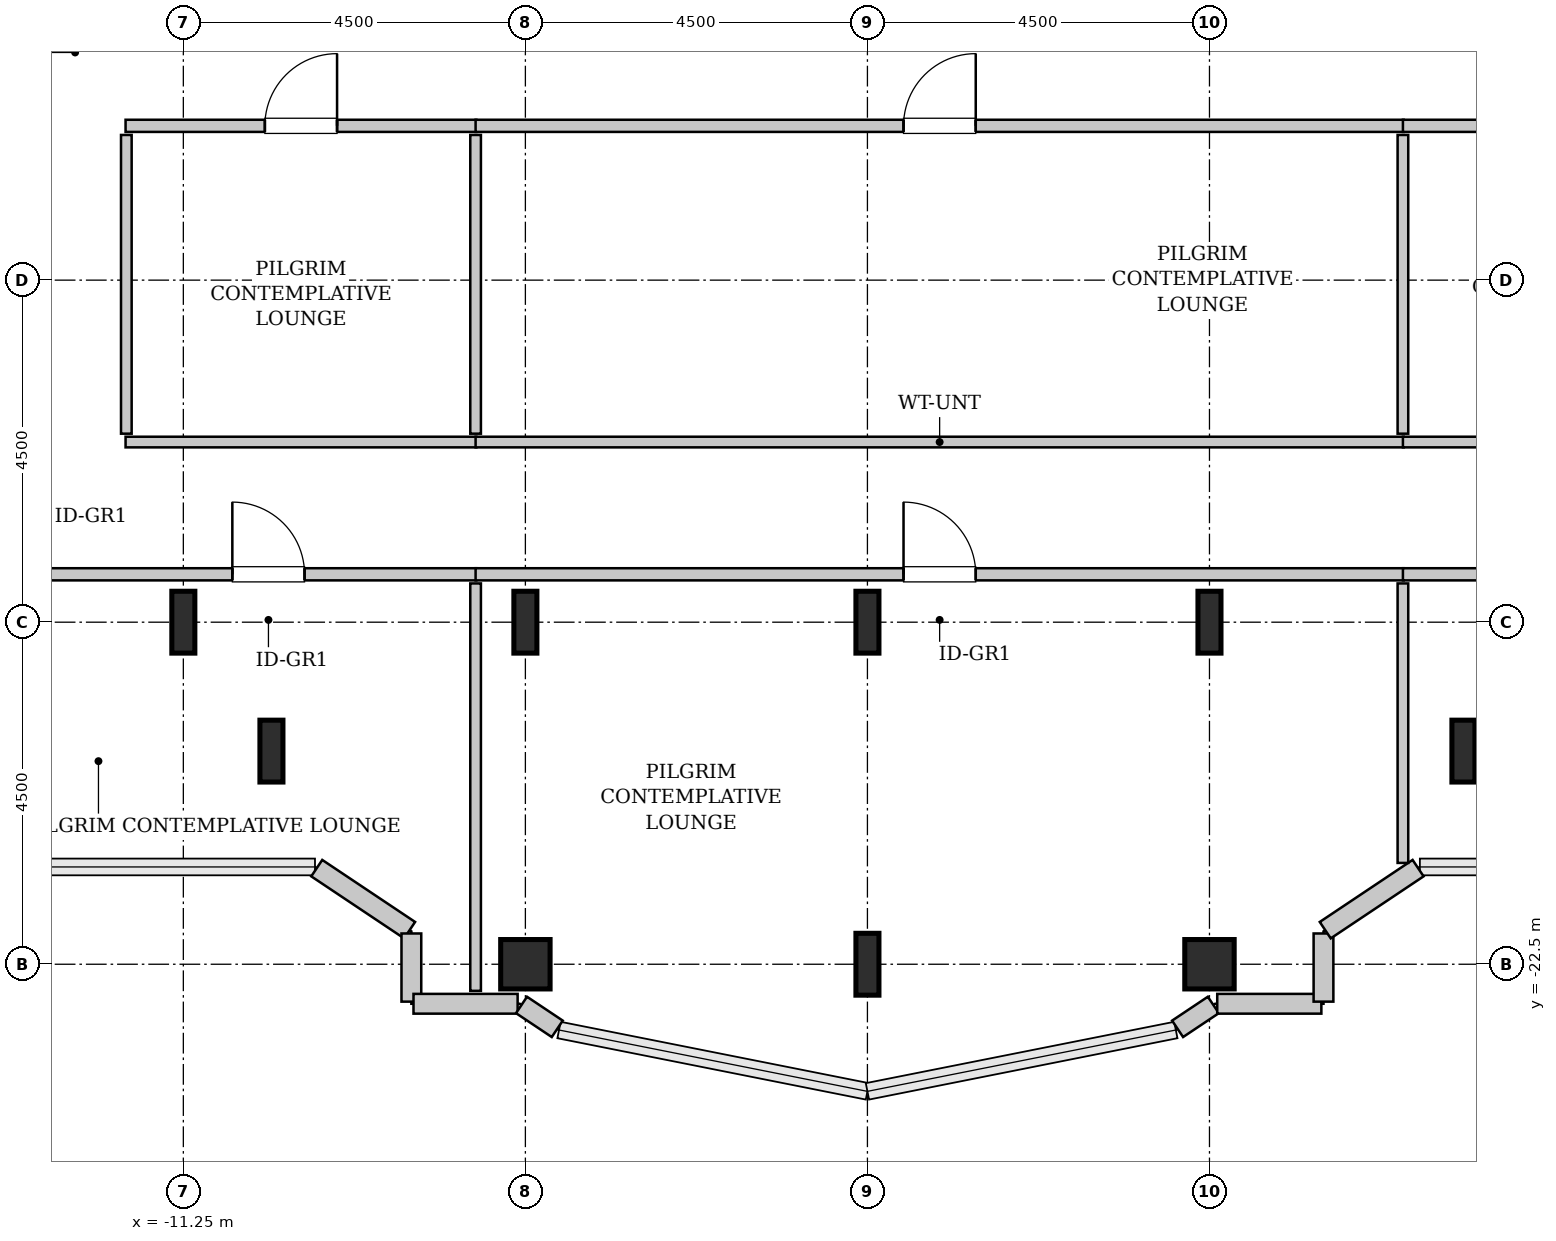
"""IFC4 building model, lengths in metres.
Left out: names, types, materials, properties, quantities, classifications, styles, units other than length and angle.
Written with IfcOpenShell. Run it as: python <this file> out.ifc"""

import sys

from ifc_helpers import new_model, si_unit, direction, frame, frame_2d, origin, origin_2d, place, context, subcontext, project, spatial, rectangle, hollow_rectangle, i_section, extrude, source, transform, mapped, element, fill, save


model = new_model("IFC4")
c1 = context("Model", 3, precision=1e-05, world=origin(), true_north=direction((0.0, 1.0)))
c2 = subcontext(c1, "Body", "Model", "MODEL_VIEW")
j1 = project(units=[si_unit("LENGTHUNIT", "METRE"), si_unit("PLANEANGLEUNIT", "RADIAN")], contexts=[c1])
p1 = place(None, origin())
s1 = spatial("IfcSite", under=j1, at=p1, CompositionType="ELEMENT")
p2 = place(p1, origin())
s2 = spatial("IfcBuilding", under=s1, at=p2, CompositionType="ELEMENT")
p3 = place(p2, frame((0.0, 0.0, 244.6)))
s3 = spatial("IfcBuildingStorey", under=s2, at=p3, CompositionType="ELEMENT", Elevation=244.6)
m1 = source(origin(), c2, "Body", "SweptSolid", [
    extrude(i_section(OverallWidth=0.303, OverallDepth=0.814, WebThickness=0.021, FlangeThickness=0.04, FilletRadius=0.03, at=origin_2d()), origin(), (0.0, 0.0, 1.0), 3.8),
])
for number, where, z_axis, x_axis in (
    (1, (-11.25, -18.0, 0.0), (0.0, 0.0, 1.0), (1.0, 0.0, 0.0)),
    (2, (-10.091, -19.696, 0.0), (0.0, 0.0, 1.0), (1.0, 0.0, 0.0)),
):
    element("IfcColumn", number, at=place(p3, frame(where, z_axis=z_axis, x_axis=x_axis)), inside=s3, PredefinedType="COLUMN", context=c2, shape_type="MappedRepresentation", body=[
        mapped(m1, transform((0.0, 0.0, 0.0), x_axis=(1.0, 0.0, 0.0), y_axis=(0.0, 1.0, 0.0), z_axis=(0.0, 0.0, 1.0), scale=1.0)),
    ])
m2 = source(origin(), c2, "Body", "SweptSolid", [
    extrude(hollow_rectangle(XDim=0.65, YDim=0.65, WallThickness=0.032, InnerFilletRadius=0.032, OuterFilletRadius=0.064, at=origin_2d()), origin(), (0.0, 0.0, 1.0), 3.8),
])
p4 = place(p3, frame((-6.75, -22.5, 0.0), z_axis=(0.0, 0.0, 1.0), x_axis=(1.0, 0.0, 0.0)))
e3 = element("IfcColumn", 3, at=p4, inside=s3, PredefinedType="COLUMN", context=c2, shape_type="MappedRepresentation", body=[
    mapped(m2, transform((0.0, 0.0, 0.0), x_axis=(1.0, 0.0, 0.0), y_axis=(0.0, 1.0, 0.0), z_axis=(0.0, 0.0, 1.0), scale=1.0)),
])
for number, where, z_axis, x_axis in (
    (4, (-6.75, -18.0, 0.0), (0.0, 0.0, 1.0), (1.0, 0.0, 0.0)),
    (5, (-2.25, -22.5, 0.0), (0.0, 0.0, 1.0), (1.0, 0.0, 0.0)),
    (6, (-2.25, -18.0, 0.0), (0.0, 0.0, 1.0), (1.0, 0.0, 0.0)),
):
    element("IfcColumn", number, at=place(p3, frame(where, z_axis=z_axis, x_axis=x_axis)), inside=s3, PredefinedType="COLUMN", context=c2, shape_type="MappedRepresentation", body=[
        mapped(m1, transform((0.0, 0.0, 0.0), x_axis=(1.0, 0.0, 0.0), y_axis=(0.0, 1.0, 0.0), z_axis=(0.0, 0.0, 1.0), scale=1.0)),
    ])
p5 = place(p3, frame((2.25, -22.5, 0.0), z_axis=(0.0, 0.0, 1.0), x_axis=(1.0, 0.0, 0.0)))
e7 = element("IfcColumn", 7, at=p5, inside=s3, PredefinedType="COLUMN", context=c2, shape_type="MappedRepresentation", body=[
    mapped(m2, transform((0.0, 0.0, 0.0), x_axis=(1.0, 0.0, 0.0), y_axis=(0.0, 1.0, 0.0), z_axis=(0.0, 0.0, 1.0), scale=1.0)),
])
for number, where, z_axis, x_axis in (
    (8, (2.25, -18.0, 0.0), (0.0, 0.0, 1.0), (1.0, 0.0, 0.0)),
    (9, (5.591, -19.696, 0.0), (0.0, 0.0, 1.0), (1.0, 0.0, 0.0)),
):
    element("IfcColumn", number, at=place(p3, frame(where, z_axis=z_axis, x_axis=x_axis)), inside=s3, PredefinedType="COLUMN", context=c2, shape_type="MappedRepresentation", body=[
        mapped(m1, transform((0.0, 0.0, 0.0), x_axis=(1.0, 0.0, 0.0), y_axis=(0.0, 1.0, 0.0), z_axis=(0.0, 0.0, 1.0), scale=1.0)),
    ])
m3 = source(origin(), c2, "Body", "SweptSolid", [
    extrude(rectangle(XDim=1.469, YDim=0.26, at=frame_2d((0.734, 0.0))), origin(), (0.0, 0.0, 1.0), 3.55),
])
p6 = place(p3, frame((-9.495, -21.236, 0.0), z_axis=(0.0, 0.0, 1.0), x_axis=(0.831461760506, -0.555581983884, 0.0)))
e10 = element("IfcWall", 10, at=p6, inside=s3, PredefinedType="SOLIDWALL", context=c2, shape_type="MappedRepresentation", body=[
    mapped(m3, transform((0.0, 0.0, 0.0), x_axis=(1.0, 0.0, 0.0), y_axis=(0.0, 1.0, 0.0), z_axis=(0.0, 0.0, 1.0), scale=1.0)),
])
m4 = source(origin(), c2, "Body", "SweptSolid", [
    extrude(rectangle(XDim=0.897, YDim=0.26, at=frame_2d((0.448, 0.0))), origin(), (0.0, 0.0, 1.0), 3.55),
])
p7 = place(p3, frame((-8.25, -22.095, 0.0), z_axis=(0.0, 0.0, 1.0), x_axis=(0.0, -1.0, 0.0)))
e11 = element("IfcWall", 11, at=p7, inside=s3, PredefinedType="SOLIDWALL", context=c2, shape_type="MappedRepresentation", body=[
    mapped(m4, transform((0.0, 0.0, 0.0), x_axis=(1.0, 0.0, 0.0), y_axis=(0.0, 1.0, 0.0), z_axis=(0.0, 0.0, 1.0), scale=1.0)),
])
m5 = source(origin(), c2, "Body", "SweptSolid", [
    extrude(rectangle(XDim=1.37, YDim=0.26, at=frame_2d((0.685, 0.0))), origin(), (0.0, 0.0, 1.0), 3.55),
])
p8 = place(p3, frame((-8.222, -23.02, 0.0), z_axis=(0.0, 0.0, 1.0), x_axis=(1.0, 0.0, 0.0)))
e12 = element("IfcWall", 12, at=p8, inside=s3, PredefinedType="SOLIDWALL", context=c2, shape_type="MappedRepresentation", body=[
    mapped(m5, transform((0.0, 0.0, 0.0), x_axis=(1.0, 0.0, 0.0), y_axis=(0.0, 1.0, 0.0), z_axis=(0.0, 0.0, 1.0), scale=1.0)),
])
m6 = source(origin(), c2, "Body", "SweptSolid", [
    extrude(rectangle(XDim=0.565, YDim=0.26, at=frame_2d((0.283, 0.0))), origin(), (0.0, 0.0, 1.0), 3.55),
])
for number, where, z_axis, x_axis in (
    (13, (-6.801, -23.036, 0.0), (0.0, 0.0, 1.0), (0.832, -0.555, 0.0)),
    (14, (1.831, -23.35, 0.0), (0.0, 0.0, 1.0), (0.832, 0.555, 0.0)),
):
    element("IfcWall", number, at=place(p3, frame(where, z_axis=z_axis, x_axis=x_axis)), inside=s3, PredefinedType="SOLIDWALL", context=c2, shape_type="MappedRepresentation", body=[
        mapped(m6, transform((0.0, 0.0, 0.0), x_axis=(1.0, 0.0, 0.0), y_axis=(0.0, 1.0, 0.0), z_axis=(0.0, 0.0, 1.0), scale=1.0)),
    ])
p9 = place(p3, frame((2.352, -23.02, 0.0), z_axis=(0.0, 0.0, 1.0), x_axis=(1.0, 0.0, 0.0)))
e15 = element("IfcWall", 15, at=p9, inside=s3, PredefinedType="SOLIDWALL", context=c2, shape_type="MappedRepresentation", body=[
    mapped(m5, transform((0.0, 0.0, 0.0), x_axis=(1.0, 0.0, 0.0), y_axis=(0.0, 1.0, 0.0), z_axis=(0.0, 0.0, 1.0), scale=1.0)),
])
p10 = place(p3, frame((3.75, -22.992, 0.0), z_axis=(0.0, 0.0, 1.0), x_axis=(0.0, 1.0, 0.0)))
e16 = element("IfcWall", 16, at=p10, inside=s3, PredefinedType="SOLIDWALL", context=c2, shape_type="MappedRepresentation", body=[
    mapped(m4, transform((0.0, 0.0, 0.0), x_axis=(1.0, 0.0, 0.0), y_axis=(0.0, 1.0, 0.0), z_axis=(0.0, 0.0, 1.0), scale=1.0)),
])
p11 = place(p3, frame((3.773, -22.052, 0.0), z_axis=(0.0, 0.0, 1.0), x_axis=(0.831461760506, 0.555581983884, 0.0)))
e17 = element("IfcWall", 17, at=p11, inside=s3, PredefinedType="SOLIDWALL", context=c2, shape_type="MappedRepresentation", body=[
    mapped(m3, transform((0.0, 0.0, 0.0), x_axis=(1.0, 0.0, 0.0), y_axis=(0.0, 1.0, 0.0), z_axis=(0.0, 0.0, 1.0), scale=1.0)),
])
m7 = source(origin(), c2, "Body", "SweptSolid", [
    extrude(rectangle(XDim=6.225, YDim=0.16, at=frame_2d((3.113, 0.0))), origin(), (0.0, 0.0, 1.0), 3.535),
])
p12 = place(p3, frame((-13.62, -17.37, 0.0), z_axis=(0.0, 0.0, 1.0), x_axis=(1.0, 0.0, 0.0)))
e18 = element("IfcWall", 18, at=p12, inside=s3, PredefinedType="PARTITIONING", context=c2, shape_type="MappedRepresentation", body=[
    mapped(m7, transform((0.0, 0.0, 0.0), x_axis=(1.0, 0.0, 0.0), y_axis=(0.0, 1.0, 0.0), z_axis=(0.0, 0.0, 1.0), scale=1.0)),
])
p13 = place(p12, frame((3.015, 0.0, 0.0)))
e19 = element("IfcOpeningElement", 19, at=p13, cuts=e18, PredefinedType="OPENING", context=c2, shape_type="SweptSolid", body=[
    extrude(rectangle(XDim=0.95, YDim=2.1, at=frame_2d((0.475, 1.05))), frame((0.0, 0.09, 0.0), z_axis=(0.0, -1.0, 0.0), x_axis=(1.0, 0.0, 0.0)), (0.0, 0.0, 1.0), 0.18),
])
m8 = source(origin(), c2, "Body", "SweptSolid", [
    extrude(rectangle(XDim=5.36, YDim=0.14, at=frame_2d((2.68, 0.0))), origin(), (0.0, 0.0, 1.0), 3.535),
])
p14 = place(p3, frame((-7.405, -22.85, 0.0), z_axis=(0.0, 0.0, 1.0), x_axis=(0.0, 1.0, 0.0)))
e20 = element("IfcWall", 20, at=p14, inside=s3, PredefinedType="PARTITIONING", context=c2, shape_type="MappedRepresentation", body=[
    mapped(m8, transform((0.0, 0.0, 0.0), x_axis=(1.0, 0.0, 0.0), y_axis=(0.0, 1.0, 0.0), z_axis=(0.0, 0.0, 1.0), scale=1.0)),
])
m9 = source(origin(), c2, "Body", "SweptSolid", [
    extrude(rectangle(XDim=4.615, YDim=0.16, at=frame_2d((2.308, 0.0))), origin(), (0.0, 0.0, 1.0), 3.535),
])
p15 = place(p3, frame((-12.01, -11.47, 0.0), z_axis=(0.0, 0.0, 1.0), x_axis=(1.0, 0.0, 0.0)))
e21 = element("IfcWall", 21, at=p15, inside=s3, PredefinedType="PARTITIONING", context=c2, shape_type="MappedRepresentation", body=[
    mapped(m9, transform((0.0, 0.0, 0.0), x_axis=(1.0, 0.0, 0.0), y_axis=(0.0, 1.0, 0.0), z_axis=(0.0, 0.0, 1.0), scale=1.0)),
])
p16 = place(p15, frame((1.833, 0.0, 0.0)))
e22 = element("IfcOpeningElement", 22, at=p16, cuts=e21, PredefinedType="OPENING", context=c2, shape_type="SweptSolid", body=[
    extrude(rectangle(XDim=0.95, YDim=2.1, at=frame_2d((0.475, 1.05))), frame((0.0, 0.09, 0.0), z_axis=(0.0, -1.0, 0.0), x_axis=(1.0, 0.0, 0.0)), (0.0, 0.0, 1.0), 0.18),
])
m10 = source(origin(), c2, "Body", "SweptSolid", [
    extrude(rectangle(XDim=4.615, YDim=0.14, at=frame_2d((2.308, 0.0))), origin(), (0.0, 0.0, 1.0), 3.535),
])
p17 = place(p3, frame((-12.01, -15.63, 0.0), z_axis=(0.0, 0.0, 1.0), x_axis=(1.0, 0.0, 0.0)))
e23 = element("IfcWall", 23, at=p17, inside=s3, PredefinedType="PARTITIONING", context=c2, shape_type="MappedRepresentation", body=[
    mapped(m10, transform((0.0, 0.0, 0.0), x_axis=(1.0, 0.0, 0.0), y_axis=(0.0, 1.0, 0.0), z_axis=(0.0, 0.0, 1.0), scale=1.0)),
])
m11 = source(origin(), c2, "Body", "SweptSolid", [
    extrude(rectangle(XDim=3.93, YDim=0.14, at=frame_2d((1.965, 0.0))), origin(), (0.0, 0.0, 1.0), 3.535),
])
for number, where, z_axis, x_axis in (
    (24, (-12.0, -15.52, 0.0), (0.0, 0.0, 1.0), (0.0, 1.0, 0.0)),
    (25, (-7.405, -15.52, 0.0), (0.0, 0.0, 1.0), (0.0, 1.0, 0.0)),
):
    element("IfcWall", number, at=place(p3, frame(where, z_axis=z_axis, x_axis=x_axis)), inside=s3, PredefinedType="PARTITIONING", context=c2, shape_type="MappedRepresentation", body=[
        mapped(m11, transform((0.0, 0.0, 0.0), x_axis=(1.0, 0.0, 0.0), y_axis=(0.0, 1.0, 0.0), z_axis=(0.0, 0.0, 1.0), scale=1.0)),
    ])
m12 = source(origin(), c2, "Body", "SweptSolid", [
    extrude(rectangle(XDim=12.21, YDim=0.16, at=frame_2d((6.105, 0.0))), origin(), (0.0, 0.0, 1.0), 3.535),
])
p18 = place(p3, frame((-7.405, -17.37, 0.0), z_axis=(0.0, 0.0, 1.0), x_axis=(1.0, 0.0, 0.0)))
e26 = element("IfcWall", 26, at=p18, inside=s3, PredefinedType="PARTITIONING", context=c2, shape_type="MappedRepresentation", body=[
    mapped(m12, transform((0.0, 0.0, 0.0), x_axis=(1.0, 0.0, 0.0), y_axis=(0.0, 1.0, 0.0), z_axis=(0.0, 0.0, 1.0), scale=1.0)),
])
p19 = place(p18, frame((5.63, 0.0, 0.0)))
e27 = element("IfcOpeningElement", 27, at=p19, cuts=e26, PredefinedType="OPENING", context=c2, shape_type="SweptSolid", body=[
    extrude(rectangle(XDim=0.95, YDim=2.1, at=frame_2d((0.475, 1.05))), frame((0.0, 0.09, 0.0), z_axis=(0.0, -1.0, 0.0), x_axis=(1.0, 0.0, 0.0)), (0.0, 0.0, 1.0), 0.18),
])
m13 = source(origin(), c2, "Body", "SweptSolid", [
    extrude(rectangle(XDim=3.677, YDim=0.14, at=frame_2d((1.838, 0.0))), origin(), (0.0, 0.0, 1.0), 3.535),
])
p20 = place(p3, frame((4.795, -21.167, 0.0), z_axis=(0.0, 0.0, 1.0), x_axis=(0.0, 1.0, 0.0)))
e28 = element("IfcWall", 28, at=p20, inside=s3, PredefinedType="PARTITIONING", context=c2, shape_type="MappedRepresentation", body=[
    mapped(m13, transform((0.0, 0.0, 0.0), x_axis=(1.0, 0.0, 0.0), y_axis=(0.0, 1.0, 0.0), z_axis=(0.0, 0.0, 1.0), scale=1.0)),
])
p21 = place(p3, frame((-7.405, -11.47, 0.0), z_axis=(0.0, 0.0, 1.0), x_axis=(1.0, 0.0, 0.0)))
e29 = element("IfcWall", 29, at=p21, inside=s3, PredefinedType="PARTITIONING", context=c2, shape_type="MappedRepresentation", body=[
    mapped(m12, transform((0.0, 0.0, 0.0), x_axis=(1.0, 0.0, 0.0), y_axis=(0.0, 1.0, 0.0), z_axis=(0.0, 0.0, 1.0), scale=1.0)),
])
p22 = place(p21, frame((5.63, 0.0, 0.0)))
e30 = element("IfcOpeningElement", 30, at=p22, cuts=e29, PredefinedType="OPENING", context=c2, shape_type="SweptSolid", body=[
    extrude(rectangle(XDim=0.95, YDim=2.1, at=frame_2d((0.475, 1.05))), frame((0.0, 0.09, 0.0), z_axis=(0.0, -1.0, 0.0), x_axis=(1.0, 0.0, 0.0)), (0.0, 0.0, 1.0), 0.18),
])
m14 = source(origin(), c2, "Body", "SweptSolid", [
    extrude(rectangle(XDim=12.21, YDim=0.14, at=frame_2d((6.105, 0.0))), origin(), (0.0, 0.0, 1.0), 3.535),
])
p23 = place(p3, frame((-7.405, -15.63, 0.0), z_axis=(0.0, 0.0, 1.0), x_axis=(1.0, 0.0, 0.0)))
e31 = element("IfcWall", 31, at=p23, inside=s3, PredefinedType="PARTITIONING", context=c2, shape_type="MappedRepresentation", body=[
    mapped(m14, transform((0.0, 0.0, 0.0), x_axis=(1.0, 0.0, 0.0), y_axis=(0.0, 1.0, 0.0), z_axis=(0.0, 0.0, 1.0), scale=1.0)),
])
p24 = place(p3, frame((4.795, -15.52, 0.0), z_axis=(0.0, 0.0, 1.0), x_axis=(0.0, 1.0, 0.0)))
e32 = element("IfcWall", 32, at=p24, inside=s3, PredefinedType="PARTITIONING", context=c2, shape_type="MappedRepresentation", body=[
    mapped(m11, transform((0.0, 0.0, 0.0), x_axis=(1.0, 0.0, 0.0), y_axis=(0.0, 1.0, 0.0), z_axis=(0.0, 0.0, 1.0), scale=1.0)),
])
m15 = source(origin(), c2, "Body", "SweptSolid", [
    extrude(rectangle(XDim=8.825, YDim=0.16, at=frame_2d((4.413, 0.0))), origin(), (0.0, 0.0, 1.0), 3.535),
])
p25 = place(p3, frame((4.795, -17.37, 0.0), z_axis=(0.0, 0.0, 1.0), x_axis=(1.0, 0.0, 0.0)))
e33 = element("IfcWall", 33, at=p25, inside=s3, PredefinedType="PARTITIONING", context=c2, shape_type="MappedRepresentation", body=[
    mapped(m15, transform((0.0, 0.0, 0.0), x_axis=(1.0, 0.0, 0.0), y_axis=(0.0, 1.0, 0.0), z_axis=(0.0, 0.0, 1.0), scale=1.0)),
])
p26 = place(p25, frame((3.938, 0.0, 0.0)))
e34 = element("IfcOpeningElement", 34, at=p26, cuts=e33, PredefinedType="OPENING", context=c2, shape_type="SweptSolid", body=[
    extrude(rectangle(XDim=0.95, YDim=2.1, at=frame_2d((0.475, 1.05))), frame((0.0, 0.09, 0.0), z_axis=(0.0, -1.0, 0.0), x_axis=(1.0, 0.0, 0.0)), (0.0, 0.0, 1.0), 0.18),
])
m16 = source(origin(), c2, "Body", "SweptSolid", [
    extrude(rectangle(XDim=7.215, YDim=0.16, at=frame_2d((3.607, 0.0))), origin(), (0.0, 0.0, 1.0), 3.535),
])
p27 = place(p3, frame((4.795, -11.47, 0.0), z_axis=(0.0, 0.0, 1.0), x_axis=(1.0, 0.0, 0.0)))
e35 = element("IfcWall", 35, at=p27, inside=s3, PredefinedType="PARTITIONING", context=c2, shape_type="MappedRepresentation", body=[
    mapped(m16, transform((0.0, 0.0, 0.0), x_axis=(1.0, 0.0, 0.0), y_axis=(0.0, 1.0, 0.0), z_axis=(0.0, 0.0, 1.0), scale=1.0)),
])
p28 = place(p27, frame((3.133, 0.0, 0.0)))
e36 = element("IfcOpeningElement", 36, at=p28, cuts=e35, PredefinedType="OPENING", context=c2, shape_type="SweptSolid", body=[
    extrude(rectangle(XDim=0.95, YDim=2.1, at=frame_2d((0.475, 1.05))), frame((0.0, 0.09, 0.0), z_axis=(0.0, -1.0, 0.0), x_axis=(1.0, 0.0, 0.0)), (0.0, 0.0, 1.0), 0.18),
])
m17 = source(origin(), c2, "Body", "SweptSolid", [
    extrude(rectangle(XDim=7.215, YDim=0.14, at=frame_2d((3.607, 0.0))), origin(), (0.0, 0.0, 1.0), 3.535),
])
p29 = place(p3, frame((4.795, -15.63, 0.0), z_axis=(0.0, 0.0, 1.0), x_axis=(1.0, 0.0, 0.0)))
e37 = element("IfcWall", 37, at=p29, inside=s3, PredefinedType="PARTITIONING", context=c2, shape_type="MappedRepresentation", body=[
    mapped(m17, transform((0.0, 0.0, 0.0), x_axis=(1.0, 0.0, 0.0), y_axis=(0.0, 1.0, 0.0), z_axis=(0.0, 0.0, 1.0), scale=1.0)),
])
m18 = source(origin(), c2, "Body", "SweptSolid", [
    extrude(rectangle(XDim=0.95, YDim=2.1, at=frame_2d((0.475, 1.05))), frame((0.0, 0.025, 0.0), z_axis=(0.0, -1.0, 0.0), x_axis=(1.0, 0.0, 0.0)), (0.0, 0.0, 1.0), 0.05),
])
p30 = place(p13, origin())
e38 = element("IfcDoor", 38, at=p30, inside=s3, OperationType="SINGLE_SWING_LEFT", PredefinedType="DOOR", context=c2, shape_type="MappedRepresentation", body=[
    mapped(m18, transform((0.0, 0.0, 0.0), x_axis=(1.0, 0.0, 0.0), y_axis=(0.0, 1.0, 0.0), z_axis=(0.0, 0.0, 1.0), scale=1.0)),
])
fill(e19, e38)
p31 = place(p16, origin())
e39 = element("IfcDoor", 39, at=p31, inside=s3, OperationType="SINGLE_SWING_RIGHT", PredefinedType="DOOR", context=c2, shape_type="MappedRepresentation", body=[
    mapped(m18, transform((0.0, 0.0, 0.0), x_axis=(1.0, 0.0, 0.0), y_axis=(0.0, 1.0, 0.0), z_axis=(0.0, 0.0, 1.0), scale=1.0)),
])
fill(e22, e39)
p32 = place(p19, origin())
e40 = element("IfcDoor", 40, at=p32, inside=s3, OperationType="SINGLE_SWING_LEFT", PredefinedType="DOOR", context=c2, shape_type="MappedRepresentation", body=[
    mapped(m18, transform((0.0, 0.0, 0.0), x_axis=(1.0, 0.0, 0.0), y_axis=(0.0, 1.0, 0.0), z_axis=(0.0, 0.0, 1.0), scale=1.0)),
])
fill(e27, e40)
p33 = place(p22, origin())
e41 = element("IfcDoor", 41, at=p33, inside=s3, OperationType="SINGLE_SWING_RIGHT", PredefinedType="DOOR", context=c2, shape_type="MappedRepresentation", body=[
    mapped(m18, transform((0.0, 0.0, 0.0), x_axis=(1.0, 0.0, 0.0), y_axis=(0.0, 1.0, 0.0), z_axis=(0.0, 0.0, 1.0), scale=1.0)),
])
fill(e30, e41)
save(model, sys.argv[1])
